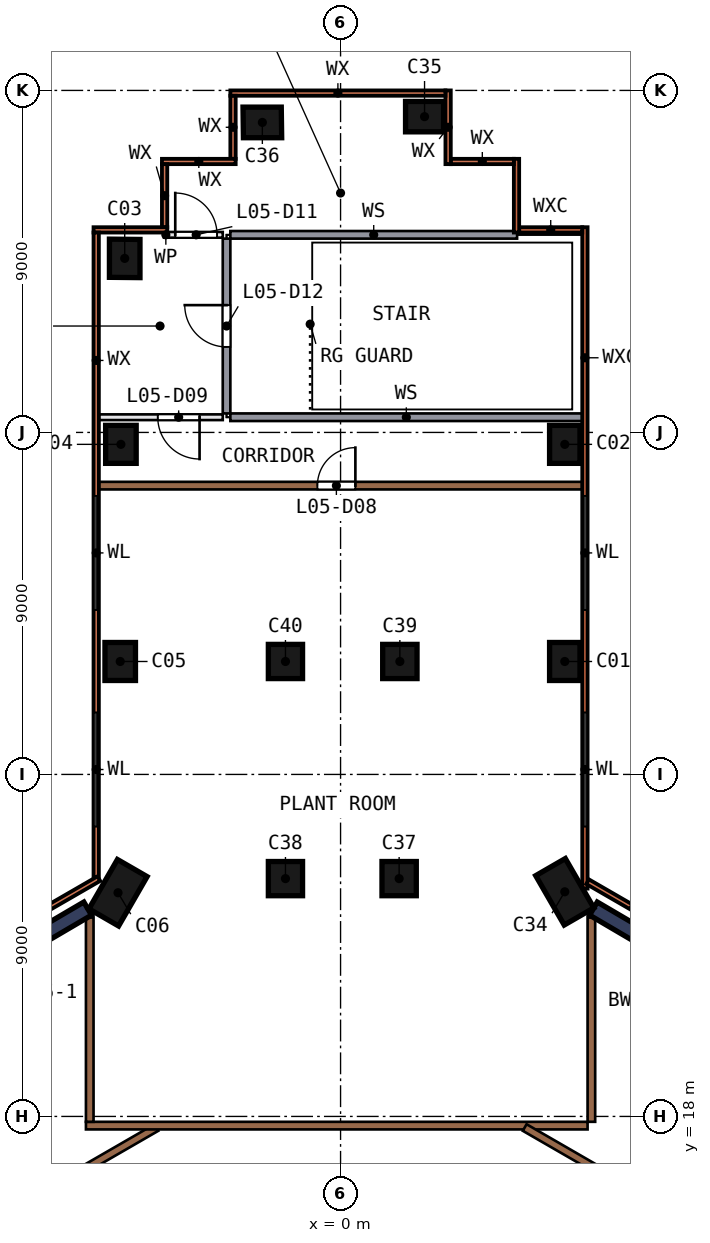
"""IFC4 building model, lengths in metres.
Left out: names, types, materials, properties, quantities, classifications, styles, units other than length and angle.
Written with IfcOpenShell. Run it as: python <this file> out.ifc"""

import sys

from ifc_helpers import new_model, si_unit, direction, frame, frame_2d, origin, origin_2d, place, context, subcontext, project, spatial, rectangle, extrude, element, fill, save


model = new_model("IFC4")
c1 = context("Model", 3, precision=1e-05, world=origin(), true_north=direction((0.0, 1.0)))
c2 = subcontext(c1, "Body", "Model", "MODEL_VIEW")
j1 = project(units=[si_unit("LENGTHUNIT", "METRE"), si_unit("PLANEANGLEUNIT", "RADIAN")], contexts=[c1])
p1 = place(None, origin())
s1 = spatial("IfcSite", under=j1, at=p1, CompositionType="ELEMENT")
p2 = place(p1, origin())
s2 = spatial("IfcBuilding", under=s1, at=p2, CompositionType="ELEMENT")
p3 = place(p2, frame((0.0, 0.0, 28.0)))
s3 = spatial("IfcBuildingStorey", under=s2, at=p3, CompositionType="ELEMENT", Elevation=28.0)
for number, where, z_axis, x_axis in (
    (1, (5.9, 29.972, 0.0), (0.0, 0.0, 1.0), (0.0, 1.0, 0.0)),
    (2, (5.9, 35.686, 0.0), (0.0, 0.0, 1.0), (0.0, 1.0, 0.0)),
):
    element("IfcColumn", number, at=place(p3, frame(where, z_axis=z_axis, x_axis=x_axis)), inside=s3, PredefinedType="COLUMN", context=c2, shape_type="SweptSolid", body=[
        extrude(rectangle(XDim=1.0, YDim=0.8, at=origin_2d()), origin(), (0.0, 0.0, 1.0), 4.5),
    ])
p4 = place(p3, frame((-5.8, 40.7, 0.0), z_axis=(0.099004221, -0.099004221, 0.990149649), x_axis=(-0.00985047, -0.995087013, -0.098512964)))
e3 = element("IfcColumn", 3, at=p4, inside=s3, PredefinedType="COLUMN", context=c2, shape_type="SweptSolid", body=[
    extrude(rectangle(XDim=1.0, YDim=0.8, at=origin_2d()), origin(), (0.0, 0.0, 1.0), 4.545),
])
p5 = place(p3, frame((-5.9, 35.686, 0.0), z_axis=(0.099493029, 0.0, 0.995038259), x_axis=(0.0, -1.0, 0.0)))
e4 = element("IfcColumn", 4, at=p5, inside=s3, PredefinedType="COLUMN", context=c2, shape_type="SweptSolid", body=[
    extrude(rectangle(XDim=1.0, YDim=0.8, at=origin_2d()), origin(), (0.0, 0.0, 1.0), 4.522),
])
p6 = place(p3, frame((-5.9, 29.972, 0.0), z_axis=(0.084655948, 0.0, 0.996410242), x_axis=(0.0, -1.0, 0.0)))
e5 = element("IfcColumn", 5, at=p6, inside=s3, PredefinedType="COLUMN", context=c2, shape_type="SweptSolid", body=[
    extrude(rectangle(XDim=1.0, YDim=0.8, at=origin_2d()), origin(), (0.0, 0.0, 1.0), 4.516),
])
p7 = place(p3, frame((-5.9, 23.912, 0.0), z_axis=(0.036588384, -0.021139955, 0.999106797), x_axis=(0.500277598, 0.865865073, 0.0)))
e6 = element("IfcColumn", 6, at=p7, inside=s3, PredefinedType="COLUMN", context=c2, shape_type="SweptSolid", body=[
    extrude(rectangle(XDim=1.5, YDim=0.9, at=origin_2d()), origin(), (0.0, 0.0, 1.0), 4.504),
])
p8 = place(p3, frame((5.9, 23.912, 0.0), z_axis=(0.0, 0.0, 1.0), x_axis=(0.5, -0.866025404, 0.0)))
e7 = element("IfcColumn", 7, at=p8, inside=s3, PredefinedType="COLUMN", context=c2, shape_type="SweptSolid", body=[
    extrude(rectangle(XDim=1.5, YDim=0.9, at=origin_2d()), origin(), (0.0, 0.0, 1.0), 4.5),
])
p9 = place(p3, frame((2.2, 44.3, 0.0), z_axis=(0.008354455, 0.008300206, 0.999930652), x_axis=(-0.999959795, 0.003326778, 0.008327084)))
e8 = element("IfcColumn", 8, at=p9, inside=s3, PredefinedType="COLUMN", context=c2, shape_type="SweptSolid", body=[
    extrude(rectangle(XDim=1.0, YDim=0.8, at=origin_2d()), origin(), (0.0, 0.0, 1.0), 4.5),
])
p10 = place(p3, frame((-2.2, 44.3, 0.0), z_axis=(0.116704103, -0.116704103, 0.986286117), x_axis=(-0.993166729, -0.013713902, 0.115895541)))
e9 = element("IfcColumn", 9, at=p10, inside=s3, PredefinedType="COLUMN", context=c2, shape_type="SweptSolid", body=[
    extrude(rectangle(XDim=1.0, YDim=0.8, at=origin_2d()), origin(), (0.0, 0.0, 1.0), 4.562),
])
p11 = place(p3, frame((1.45, 24.258, 0.0), z_axis=(0.075844281, 0.0, 0.997119674), x_axis=(0.0, 1.0, 0.0)))
e10 = element("IfcColumn", 10, at=p11, inside=s3, PredefinedType="COLUMN", context=c2, shape_type="SweptSolid", body=[
    extrude(rectangle(XDim=0.9, YDim=0.9, at=origin_2d()), origin(), (0.0, 0.0, 1.0), 4.513),
])
p12 = place(p3, frame((-1.45, 24.258, 0.0), z_axis=(0.0, 0.0, 1.0), x_axis=(0.0, 1.0, 0.0)))
e11 = element("IfcColumn", 11, at=p12, inside=s3, PredefinedType="COLUMN", context=c2, shape_type="SweptSolid", body=[
    extrude(rectangle(XDim=0.9, YDim=0.9, at=origin_2d()), origin(), (0.0, 0.0, 1.0), 4.5),
])
p13 = place(p3, frame((1.45, 29.972, 0.0), z_axis=(0.091626825, 0.0, 0.995793415), x_axis=(0.0, 1.0, 0.0)))
e12 = element("IfcColumn", 12, at=p13, inside=s3, PredefinedType="COLUMN", context=c2, shape_type="SweptSolid", body=[
    extrude(rectangle(XDim=0.9, YDim=0.9, at=origin_2d()), origin(), (0.0, 0.0, 1.0), 4.519),
])
p14 = place(p3, frame((-1.45, 29.972, 0.0), z_axis=(0.0, 0.0, 1.0), x_axis=(0.0, 1.0, 0.0)))
e13 = element("IfcColumn", 13, at=p14, inside=s3, PredefinedType="COLUMN", context=c2, shape_type="SweptSolid", body=[
    extrude(rectangle(XDim=0.9, YDim=0.9, at=origin_2d()), origin(), (0.0, 0.0, 1.0), 4.5),
])
for number, where, z_axis, x_axis in (
    (14, (-6.654, 23.469, 0.0), (0.0, 0.0, 1.0), (-0.862, -0.506, 0.0)),
    (15, (11.155, 20.827, 0.0), (0.0, 0.0, 1.0), (-0.862, 0.506, 0.0)),
):
    element("IfcWall", number, at=place(p3, frame(where, z_axis=z_axis, x_axis=x_axis)), inside=s3, PredefinedType="SHEAR", context=c2, shape_type="SweptSolid", body=[
        extrude(rectangle(XDim=5.219, YDim=0.4, at=frame_2d((2.609, 0.0))), origin(), (0.0, 0.0, 1.0), 4.5),
    ])
p15 = place(p3, frame((6.43, 23.995, 0.0), z_axis=(0.0, 0.0, 1.0), x_axis=(0.0, 1.0, 0.0)))
e16 = element("IfcWall", 16, at=p15, inside=s3, PredefinedType="SOLIDWALL", context=c2, shape_type="SweptSolid", body=[
    extrude(rectangle(XDim=17.405, YDim=0.14, at=frame_2d((8.702, 0.0))), origin(), (0.0, 0.0, 1.0), 4.5),
])
p16 = place(p15, frame((1.634, 0.0, 0.9)))
e17 = element("IfcOpeningElement", 17, at=p16, cuts=e16, PredefinedType="OPENING", context=c2, shape_type="SweptSolid", body=[
    extrude(rectangle(XDim=3.0, YDim=3.3, at=frame_2d((1.5, 1.65))), frame((0.0, 0.08, 0.0), z_axis=(0.0, -1.0, 0.0), x_axis=(1.0, 0.0, 0.0)), (0.0, 0.0, 1.0), 0.16),
])
p17 = place(p15, frame((7.334, 0.0, 0.9)))
e18 = element("IfcOpeningElement", 18, at=p17, cuts=e16, PredefinedType="OPENING", context=c2, shape_type="SweptSolid", body=[
    extrude(rectangle(XDim=3.0, YDim=3.3, at=frame_2d((1.5, 1.65))), frame((0.0, 0.08, 0.0), z_axis=(0.0, -1.0, 0.0), x_axis=(1.0, 0.0, 0.0)), (0.0, 0.0, 1.0), 0.16),
])
p18 = place(p3, frame((6.36, 41.33, 0.0), z_axis=(0.0, 0.0, 1.0), x_axis=(-1.0, 0.0, 0.0)))
e19 = element("IfcWall", 19, at=p18, inside=s3, PredefinedType="SOLIDWALL", context=c2, shape_type="SweptSolid", body=[
    extrude(rectangle(XDim=1.66, YDim=0.14, at=frame_2d((0.83, 0.0))), origin(), (0.0, 0.0, 1.0), 4.5),
])
p19 = place(p3, frame((4.63, 41.26, 0.0), z_axis=(0.0, 0.0, 1.0), x_axis=(0.0, 1.0, 0.0)))
e20 = element("IfcWall", 20, at=p19, inside=s3, PredefinedType="SOLIDWALL", context=c2, shape_type="SweptSolid", body=[
    extrude(rectangle(XDim=1.94, YDim=0.14, at=frame_2d((0.97, 0.0))), origin(), (0.0, 0.0, 1.0), 4.5),
])
p20 = place(p3, frame((4.56, 43.13, 0.0), z_axis=(0.0, 0.0, 1.0), x_axis=(-1.0, 0.0, 0.0)))
e21 = element("IfcWall", 21, at=p20, inside=s3, PredefinedType="SOLIDWALL", context=c2, shape_type="SweptSolid", body=[
    extrude(rectangle(XDim=1.66, YDim=0.14, at=frame_2d((0.83, 0.0))), origin(), (0.0, 0.0, 1.0), 4.5),
])
p21 = place(p3, frame((2.83, 43.06, 0.0), z_axis=(0.0, 0.0, 1.0), x_axis=(0.0, 1.0, 0.0)))
e22 = element("IfcWall", 22, at=p21, inside=s3, PredefinedType="SOLIDWALL", context=c2, shape_type="SweptSolid", body=[
    extrude(rectangle(XDim=1.94, YDim=0.14, at=frame_2d((0.97, 0.0))), origin(), (0.0, 0.0, 1.0), 4.5),
])
p22 = place(p3, frame((2.76, 44.93, 0.0), z_axis=(0.0, 0.0, 1.0), x_axis=(-1.0, 0.0, 0.0)))
e23 = element("IfcWall", 23, at=p22, inside=s3, PredefinedType="SOLIDWALL", context=c2, shape_type="SweptSolid", body=[
    extrude(rectangle(XDim=5.66, YDim=0.14, at=frame_2d((2.83, 0.0))), origin(), (0.0, 0.0, 1.0), 4.5),
])
p23 = place(p3, frame((-2.83, 44.86, 0.0), z_axis=(0.0, 0.0, 1.0), x_axis=(0.0, -1.0, 0.0)))
e24 = element("IfcWall", 24, at=p23, inside=s3, PredefinedType="SOLIDWALL", context=c2, shape_type="SweptSolid", body=[
    extrude(rectangle(XDim=1.66, YDim=0.14, at=frame_2d((0.83, 0.0))), origin(), (0.0, 0.0, 1.0), 4.5),
])
p24 = place(p3, frame((-2.76, 43.13, 0.0), z_axis=(0.0, 0.0, 1.0), x_axis=(-1.0, 0.0, 0.0)))
e25 = element("IfcWall", 25, at=p24, inside=s3, PredefinedType="SOLIDWALL", context=c2, shape_type="SweptSolid", body=[
    extrude(rectangle(XDim=1.94, YDim=0.14, at=frame_2d((0.97, 0.0))), origin(), (0.0, 0.0, 1.0), 4.5),
])
p25 = place(p3, frame((-4.63, 43.06, 0.0), z_axis=(0.0, 0.0, 1.0), x_axis=(0.0, -1.0, 0.0)))
e26 = element("IfcWall", 26, at=p25, inside=s3, PredefinedType="SOLIDWALL", context=c2, shape_type="SweptSolid", body=[
    extrude(rectangle(XDim=1.66, YDim=0.14, at=frame_2d((0.83, 0.0))), origin(), (0.0, 0.0, 1.0), 4.5),
])
p26 = place(p3, frame((-4.56, 41.33, 0.0), z_axis=(0.0, 0.0, 1.0), x_axis=(-1.0, 0.0, 0.0)))
e27 = element("IfcWall", 27, at=p26, inside=s3, PredefinedType="SOLIDWALL", context=c2, shape_type="SweptSolid", body=[
    extrude(rectangle(XDim=1.94, YDim=0.14, at=frame_2d((0.97, 0.0))), origin(), (0.0, 0.0, 1.0), 4.5),
])
p27 = place(p3, frame((-6.43, 41.26, 0.0), z_axis=(0.0, 0.0, 1.0), x_axis=(0.0, -1.0, 0.0)))
e28 = element("IfcWall", 28, at=p27, inside=s3, PredefinedType="SOLIDWALL", context=c2, shape_type="SweptSolid", body=[
    extrude(rectangle(XDim=16.961, YDim=0.14, at=frame_2d((8.481, 0.0))), origin(), (0.0, 0.0, 1.0), 4.5),
])
p28 = place(p27, frame((6.931, 0.0, 0.9)))
e29 = element("IfcOpeningElement", 29, at=p28, cuts=e28, PredefinedType="OPENING", context=c2, shape_type="SweptSolid", body=[
    extrude(rectangle(XDim=3.0, YDim=3.3, at=frame_2d((1.5, 1.65))), frame((0.0, 0.08, 0.0), z_axis=(0.0, -1.0, 0.0), x_axis=(1.0, 0.0, 0.0)), (0.0, 0.0, 1.0), 0.16),
])
p29 = place(p27, frame((12.631, 0.0, 0.9)))
e30 = element("IfcOpeningElement", 30, at=p29, cuts=e28, PredefinedType="OPENING", context=c2, shape_type="SweptSolid", body=[
    extrude(rectangle(XDim=3.0, YDim=3.3, at=frame_2d((1.5, 1.65))), frame((0.0, 0.08, 0.0), z_axis=(0.0, -1.0, 0.0), x_axis=(1.0, 0.0, 0.0)), (0.0, 0.0, 1.0), 0.16),
])
p30 = place(p3, frame((-6.36, 24.258, 0.0), z_axis=(0.0, 0.0, 1.0), x_axis=(-0.866029009, -0.499993756, 0.0)))
e31 = element("IfcWall", 31, at=p30, inside=s3, PredefinedType="SOLIDWALL", context=c2, shape_type="SweptSolid", body=[
    extrude(rectangle(XDim=13.242, YDim=0.14, at=frame_2d((6.621, 0.0))), origin(), (0.0, 0.0, 1.0), 4.5),
])
p31 = place(p30, frame((1.46, 0.0, 0.9)))
e32 = element("IfcOpeningElement", 32, at=p31, cuts=e31, PredefinedType="OPENING", context=c2, shape_type="SweptSolid", body=[
    extrude(rectangle(XDim=3.6, YDim=3.3, at=frame_2d((1.8, 1.65))), frame((0.0, 0.08, 0.0), z_axis=(0.0, -1.0, 0.0), x_axis=(1.0, 0.0, 0.0)), (0.0, 0.0, 1.0), 0.16),
])
p32 = place(p30, frame((8.215, 0.0, 0.9)))
e33 = element("IfcOpeningElement", 33, at=p32, cuts=e31, PredefinedType="OPENING", context=c2, shape_type="SweptSolid", body=[
    extrude(rectangle(XDim=3.0, YDim=3.3, at=frame_2d((1.5, 1.65))), frame((0.0, 0.08, 0.0), z_axis=(0.0, -1.0, 0.0), x_axis=(1.0, 0.0, 0.0)), (0.0, 0.0, 1.0), 0.16),
])
p33 = place(p3, frame((17.586, 17.777, 0.0), z_axis=(0.0, 0.0, 1.0), x_axis=(-0.866023287, 0.500003667, 0.0)))
e34 = element("IfcWall", 34, at=p33, inside=s3, PredefinedType="SOLIDWALL", context=c2, shape_type="SweptSolid", body=[
    extrude(rectangle(XDim=12.801, YDim=0.14, at=frame_2d((6.4, 0.0))), origin(), (0.0, 0.0, 1.0), 4.5),
])
p34 = place(p33, frame((1.748, 0.0, 0.9)))
e35 = element("IfcOpeningElement", 35, at=p34, cuts=e34, PredefinedType="OPENING", context=c2, shape_type="SweptSolid", body=[
    extrude(rectangle(XDim=3.0, YDim=3.3, at=frame_2d((1.5, 1.65))), frame((0.0, 0.08, 0.0), z_axis=(0.0, -1.0, 0.0), x_axis=(1.0, 0.0, 0.0)), (0.0, 0.0, 1.0), 0.16),
])
p35 = place(p33, frame((7.902, 0.0, 0.9)))
e36 = element("IfcOpeningElement", 36, at=p35, cuts=e34, PredefinedType="OPENING", context=c2, shape_type="SweptSolid", body=[
    extrude(rectangle(XDim=3.6, YDim=3.3, at=frame_2d((1.8, 1.65))), frame((0.0, 0.08, 0.0), z_axis=(0.0, -1.0, 0.0), x_axis=(1.0, 0.0, 0.0)), (0.0, 0.0, 1.0), 0.16),
])
p36 = place(p3, frame((-12.704, 13.171, 0.0), z_axis=(0.0, 0.0, 1.0), x_axis=(0.866031025, 0.499990264, 0.0)))
e37 = element("IfcWall", 37, at=p36, inside=s3, PredefinedType="SOLIDWALL", context=c2, shape_type="SweptSolid", body=[
    extrude(rectangle(XDim=9.075, YDim=0.2, at=frame_2d((4.538, 0.0))), origin(), (0.0, 0.0, 1.0), 4.5),
])
p37 = place(p36, frame((3.95, 0.0, 0.0)))
e38 = element("IfcOpeningElement", 38, at=p37, cuts=e37, PredefinedType="OPENING", context=c2, shape_type="SweptSolid", body=[
    extrude(rectangle(XDim=1.0, YDim=2.1, at=frame_2d((0.5, 1.05))), frame((0.0, 0.11, 0.0), z_axis=(0.0, -1.0, 0.0), x_axis=(1.0, 0.0, 0.0)), (0.0, 0.0, 1.0), 0.22),
])
p38 = place(p3, frame((-6.7, 17.758, 0.0), z_axis=(0.0, 0.0, 1.0), x_axis=(1.0, 0.0, 0.0)))
e39 = element("IfcWall", 39, at=p38, inside=s3, PredefinedType="SOLIDWALL", context=c2, shape_type="SweptSolid", body=[
    extrude(rectangle(XDim=13.2, YDim=0.2, at=frame_2d((6.6, 0.0))), origin(), (0.0, 0.0, 1.0), 4.5),
])
p39 = place(p3, frame((-6.6, 23.234, 0.0), z_axis=(0.0, 0.0, 1.0), x_axis=(0.0, -1.0, 0.0)))
e40 = element("IfcWall", 40, at=p39, inside=s3, PredefinedType="SOLIDWALL", context=c2, shape_type="SweptSolid", body=[
    extrude(rectangle(XDim=5.376, YDim=0.2, at=frame_2d((2.688, 0.0))), origin(), (0.0, 0.0, 1.0), 4.5),
])
p40 = place(p3, frame((-6.36, 34.6, 0.0), z_axis=(0.0, 0.0, 1.0), x_axis=(1.0, 0.0, 0.0)))
e41 = element("IfcWall", 41, at=p40, inside=s3, PredefinedType="SOLIDWALL", context=c2, shape_type="SweptSolid", body=[
    extrude(rectangle(XDim=12.72, YDim=0.2, at=frame_2d((6.36, 0.0))), origin(), (0.0, 0.0, 1.0), 4.5),
])
p41 = place(p40, frame((5.75, 0.0, 0.0)))
e42 = element("IfcOpeningElement", 42, at=p41, cuts=e41, PredefinedType="OPENING", context=c2, shape_type="SweptSolid", body=[
    extrude(rectangle(XDim=1.0, YDim=2.1, at=frame_2d((0.5, 1.05))), frame((0.0, 0.11, 0.0), z_axis=(0.0, -1.0, 0.0), x_axis=(1.0, 0.0, 0.0)), (0.0, 0.0, 1.0), 0.22),
])
p42 = place(p3, frame((-3.1, 36.4, 0.0), z_axis=(0.0, 0.0, 1.0), x_axis=(-1.0, 0.0, 0.0)))
e43 = element("IfcWall", 43, at=p42, inside=s3, PredefinedType="PARTITIONING", context=c2, shape_type="SweptSolid", body=[
    extrude(rectangle(XDim=3.26, YDim=0.15, at=frame_2d((1.63, 0.0))), origin(), (0.0, 0.0, 1.0), 4.5),
])
p43 = place(p42, frame((0.61, 0.0, 0.0)))
e44 = element("IfcOpeningElement", 44, at=p43, cuts=e43, PredefinedType="OPENING", context=c2, shape_type="SweptSolid", body=[
    extrude(rectangle(XDim=1.1, YDim=2.1, at=frame_2d((0.55, 1.05))), frame((0.0, 0.085, 0.0), z_axis=(0.0, -1.0, 0.0), x_axis=(1.0, 0.0, 0.0)), (0.0, 0.0, 1.0), 0.17),
])
p44 = place(p3, frame((-2.9, 36.4, 0.0), z_axis=(0.0, 0.0, 1.0), x_axis=(1.0, 0.0, 0.0)))
e45 = element("IfcWall", 45, at=p44, inside=s3, PredefinedType="SOLIDWALL", context=c2, shape_type="SweptSolid", body=[
    extrude(rectangle(XDim=9.26, YDim=0.2, at=frame_2d((4.63, 0.0))), origin(), (0.0, 0.0, 1.0), 4.5),
])
p45 = place(p3, frame((-4.645, 41.2, 0.0), z_axis=(0.0, 0.0, 1.0), x_axis=(1.0, 0.0, 0.0)))
e46 = element("IfcWall", 46, at=p45, inside=s3, PredefinedType="PARTITIONING", context=c2, shape_type="SweptSolid", body=[
    extrude(rectangle(XDim=1.545, YDim=0.15, at=frame_2d((0.772, 0.0))), origin(), (0.0, 0.0, 1.0), 4.5),
])
p46 = place(p45, frame((0.295, 0.0, 0.0)))
e47 = element("IfcOpeningElement", 47, at=p46, cuts=e46, PredefinedType="OPENING", context=c2, shape_type="SweptSolid", body=[
    extrude(rectangle(XDim=1.1, YDim=2.1, at=frame_2d((0.55, 1.05))), frame((0.0, 0.085, 0.0), z_axis=(0.0, -1.0, 0.0), x_axis=(1.0, 0.0, 0.0)), (0.0, 0.0, 1.0), 0.17),
])
p47 = place(p3, frame((-3.0, 36.5, 0.0), z_axis=(0.0, 0.0, 1.0), x_axis=(0.0, 1.0, 0.0)))
e48 = element("IfcWall", 48, at=p47, inside=s3, PredefinedType="SOLIDWALL", context=c2, shape_type="SweptSolid", body=[
    extrude(rectangle(XDim=4.6, YDim=0.2, at=frame_2d((2.3, 0.0))), origin(), (0.0, 0.0, 1.0), 4.5),
])
p48 = place(p47, frame((1.75, 0.0, 0.0)))
e49 = element("IfcOpeningElement", 49, at=p48, cuts=e48, PredefinedType="OPENING", context=c2, shape_type="SweptSolid", body=[
    extrude(rectangle(XDim=1.1, YDim=2.1, at=frame_2d((0.55, 1.05))), frame((0.0, 0.11, 0.0), z_axis=(0.0, -1.0, 0.0), x_axis=(1.0, 0.0, 0.0)), (0.0, 0.0, 1.0), 0.22),
])
p49 = place(p3, frame((4.845, 17.708, 0.0), z_axis=(0.0, 0.0, 1.0), x_axis=(0.866031025, -0.499990264, 0.0)))
e50 = element("IfcWall", 50, at=p49, inside=s3, PredefinedType="SOLIDWALL", context=c2, shape_type="SweptSolid", body=[
    extrude(rectangle(XDim=9.075, YDim=0.2, at=frame_2d((4.538, 0.0))), origin(), (0.0, 0.0, 1.0), 4.5),
])
p50 = place(p49, frame((3.95, 0.0, 0.0)))
e51 = element("IfcOpeningElement", 51, at=p50, cuts=e50, PredefinedType="OPENING", context=c2, shape_type="SweptSolid", body=[
    extrude(rectangle(XDim=1.0, YDim=2.1, at=frame_2d((0.5, 1.05))), frame((0.0, 0.11, 0.0), z_axis=(0.0, -1.0, 0.0), x_axis=(1.0, 0.0, 0.0)), (0.0, 0.0, 1.0), 0.22),
])
p51 = place(p3, frame((4.645, 41.2, 0.0), z_axis=(0.0, 0.0, 1.0), x_axis=(-1.0, 0.0, 0.0)))
e52 = element("IfcWall", 52, at=p51, inside=s3, PredefinedType="SOLIDWALL", context=c2, shape_type="SweptSolid", body=[
    extrude(rectangle(XDim=7.545, YDim=0.2, at=frame_2d((3.772, 0.0))), origin(), (0.0, 0.0, 1.0), 4.5),
])
p52 = place(p3, frame((6.6, 17.858, 0.0), z_axis=(0.0, 0.0, 1.0), x_axis=(0.0, 1.0, 0.0)))
e53 = element("IfcWall", 53, at=p52, inside=s3, PredefinedType="SOLIDWALL", context=c2, shape_type="SweptSolid", body=[
    extrude(rectangle(XDim=5.376, YDim=0.2, at=frame_2d((2.688, 0.0))), origin(), (0.0, 0.0, 1.0), 4.5),
])
p53 = place(p16, origin())
e54 = element("IfcWindow", 54, at=p53, inside=s3, PartitioningType="SINGLE_PANEL", PredefinedType="WINDOW", context=c2, shape_type="SweptSolid", body=[
    extrude(rectangle(XDim=3.0, YDim=3.3, at=frame_2d((1.5, 1.65))), frame((0.0, 0.03, 0.0), z_axis=(0.0, -1.0, 0.0), x_axis=(1.0, 0.0, 0.0)), (0.0, 0.0, 1.0), 0.06),
])
fill(e17, e54)
p54 = place(p17, origin())
e55 = element("IfcWindow", 55, at=p54, inside=s3, PartitioningType="SINGLE_PANEL", PredefinedType="WINDOW", context=c2, shape_type="SweptSolid", body=[
    extrude(rectangle(XDim=3.0, YDim=3.3, at=frame_2d((1.5, 1.65))), frame((0.0, 0.03, 0.0), z_axis=(0.0, -1.0, 0.0), x_axis=(1.0, 0.0, 0.0)), (0.0, 0.0, 1.0), 0.06),
])
fill(e18, e55)
p55 = place(p28, origin())
e56 = element("IfcWindow", 56, at=p55, inside=s3, PartitioningType="SINGLE_PANEL", PredefinedType="WINDOW", context=c2, shape_type="SweptSolid", body=[
    extrude(rectangle(XDim=3.0, YDim=3.3, at=frame_2d((1.5, 1.65))), frame((0.0, 0.03, 0.0), z_axis=(0.0, -1.0, 0.0), x_axis=(1.0, 0.0, 0.0)), (0.0, 0.0, 1.0), 0.06),
])
fill(e29, e56)
p56 = place(p29, origin())
e57 = element("IfcWindow", 57, at=p56, inside=s3, PartitioningType="SINGLE_PANEL", PredefinedType="WINDOW", context=c2, shape_type="SweptSolid", body=[
    extrude(rectangle(XDim=3.0, YDim=3.3, at=frame_2d((1.5, 1.65))), frame((0.0, 0.03, 0.0), z_axis=(0.0, -1.0, 0.0), x_axis=(1.0, 0.0, 0.0)), (0.0, 0.0, 1.0), 0.06),
])
fill(e30, e57)
p57 = place(p41, origin())
e58 = element("IfcDoor", 58, at=p57, inside=s3, OperationType="SINGLE_SWING_RIGHT", PredefinedType="DOOR", context=c2, shape_type="SweptSolid", body=[
    extrude(rectangle(XDim=1.0, YDim=2.1, at=frame_2d((0.5, 1.05))), frame((0.0, 0.025, 0.0), z_axis=(0.0, -1.0, 0.0), x_axis=(1.0, 0.0, 0.0)), (0.0, 0.0, 1.0), 0.05),
])
fill(e42, e58)
p58 = place(p43, origin())
e59 = element("IfcDoor", 59, at=p58, inside=s3, OperationType="SINGLE_SWING_LEFT", PredefinedType="DOOR", context=c2, shape_type="SweptSolid", body=[
    extrude(rectangle(XDim=1.1, YDim=2.1, at=frame_2d((0.55, 1.05))), frame((0.0, 0.025, 0.0), z_axis=(0.0, -1.0, 0.0), x_axis=(1.0, 0.0, 0.0)), (0.0, 0.0, 1.0), 0.05),
])
fill(e44, e59)
p59 = place(p46, origin())
e60 = element("IfcDoor", 60, at=p59, inside=s3, OperationType="SINGLE_SWING_LEFT", PredefinedType="DOOR", context=c2, shape_type="SweptSolid", body=[
    extrude(rectangle(XDim=1.1, YDim=2.1, at=frame_2d((0.55, 1.05))), frame((0.0, 0.025, 0.0), z_axis=(0.0, -1.0, 0.0), x_axis=(1.0, 0.0, 0.0)), (0.0, 0.0, 1.0), 0.05),
])
fill(e47, e60)
p60 = place(p48, origin())
e61 = element("IfcDoor", 61, at=p60, inside=s3, OperationType="SINGLE_SWING_RIGHT", PredefinedType="DOOR", context=c2, shape_type="SweptSolid", body=[
    extrude(rectangle(XDim=1.1, YDim=2.1, at=frame_2d((0.55, 1.05))), frame((0.0, 0.025, 0.0), z_axis=(0.0, -1.0, 0.0), x_axis=(1.0, 0.0, 0.0)), (0.0, 0.0, 1.0), 0.05),
])
fill(e49, e61)
save(model, sys.argv[1])
